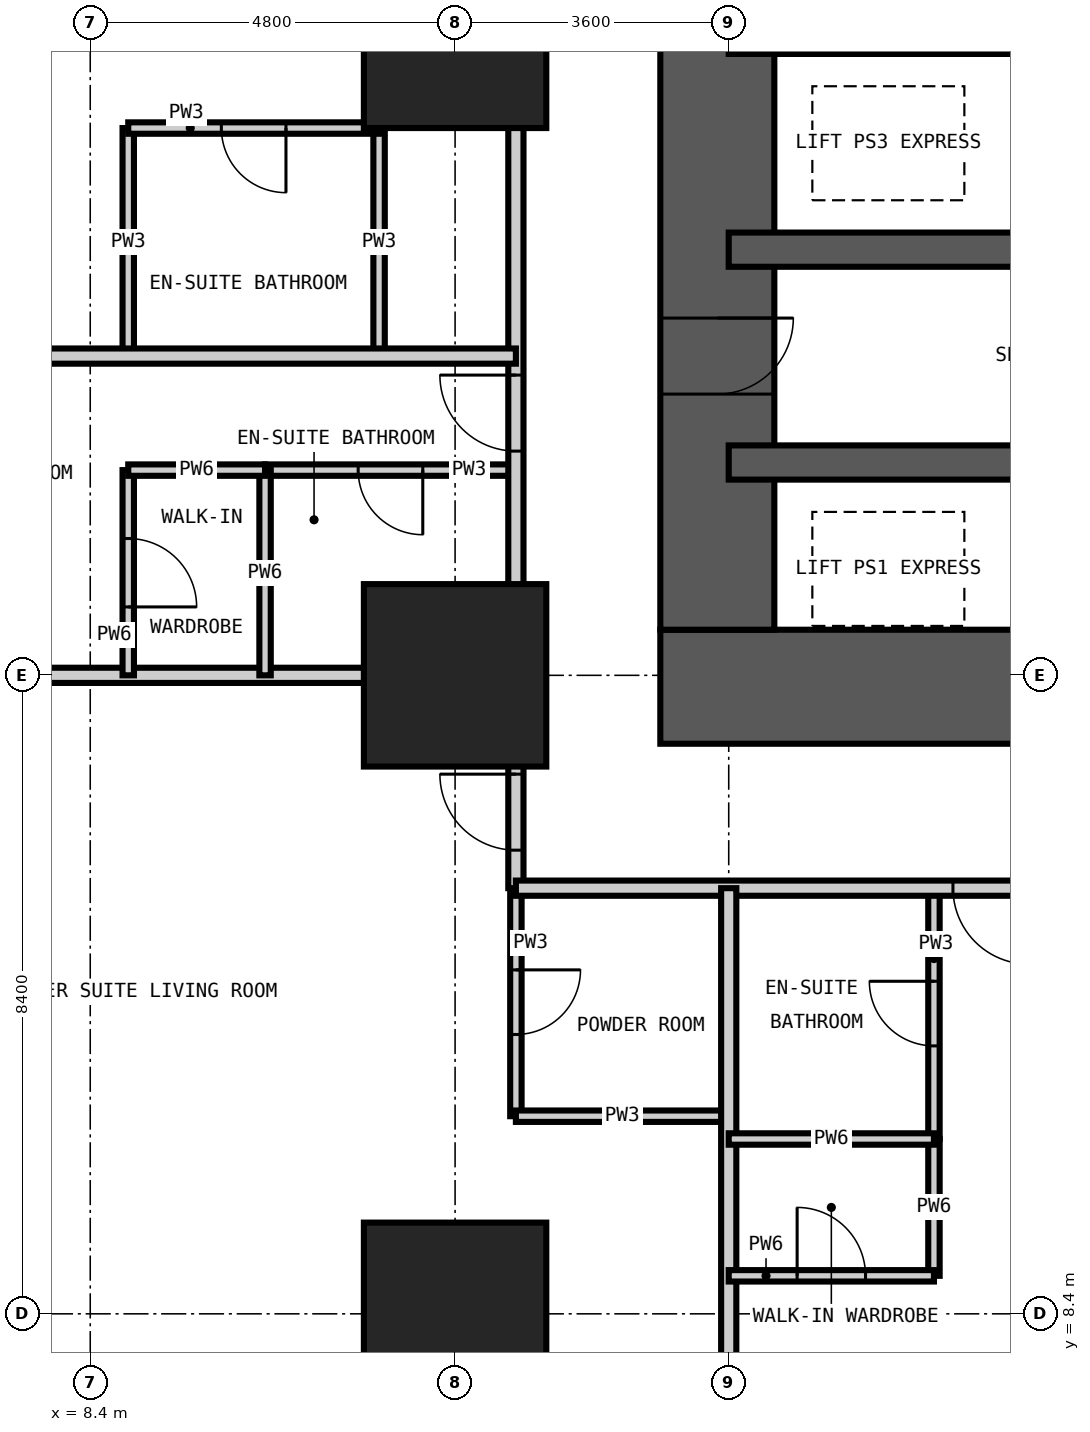
"""IFC4 building model, lengths in metres.
Left out: names, types, materials, properties, quantities, classifications, styles, units other than length and angle.
Written with IfcOpenShell. Run it as: python <this file> out.ifc"""

import sys

from ifc_helpers import new_model, si_unit, direction, frame, frame_2d, origin, origin_2d, place, context, subcontext, project, spatial, rectangle, extrude, element, fill, save


model = new_model("IFC4")
c1 = context("Model", 3, precision=1e-05, world=origin(), true_north=direction((0.0, 1.0)))
c2 = subcontext(c1, "Body", "Model", "MODEL_VIEW")
j1 = project(units=[si_unit("LENGTHUNIT", "METRE"), si_unit("PLANEANGLEUNIT", "RADIAN")], contexts=[c1])
p1 = place(None, origin())
s1 = spatial("IfcSite", under=j1, at=p1, CompositionType="ELEMENT")
p2 = place(p1, origin())
s2 = spatial("IfcBuilding", under=s1, at=p2, CompositionType="ELEMENT")
p3 = place(p2, frame((0.0, 0.0, 81.0)))
s3 = spatial("IfcBuildingStorey", under=s2, at=p3, CompositionType="ELEMENT", Elevation=81.0)
for number, where, z_axis, x_axis in (
    (1, (13.2, 8.4, -0.35), (0.0, 0.0, 1.0), (1.0, 0.0, 0.0)),
    (2, (13.2, 16.8, -0.35), (0.0, 0.0, 1.0), (1.0, 0.0, 0.0)),
    (3, (13.2, 25.2, -0.35), (0.0, 0.0, 1.0), (1.0, 0.0, 0.0)),
):
    element("IfcColumn", number, at=place(p3, frame(where, z_axis=z_axis, x_axis=x_axis)), inside=s3, PredefinedType="COLUMN", context=c2, shape_type="SweptSolid", body=[
        extrude(rectangle(XDim=2.4, YDim=2.4, at=origin_2d()), origin(), (0.0, 0.0, 1.0), 3.6),
    ])
p4 = place(p3, frame((15.9, 16.65, -0.35), z_axis=(0.0, 0.0, 1.0), x_axis=(1.0, 0.0, 0.0)))
e4 = element("IfcWall", 4, at=p4, inside=s3, PredefinedType="SHEAR", context=c2, shape_type="SweptSolid", body=[
    extrude(rectangle(XDim=27.0, YDim=1.5, at=frame_2d((13.5, 0.0))), origin(), (0.0, 0.0, 1.0), 3.6),
])
p5 = place(p4, frame((13.0, 0.0, 0.35)))
e5 = element("IfcOpeningElement", 5, at=p5, cuts=e4, PredefinedType="OPENING", context=c2, shape_type="SweptSolid", body=[
    extrude(rectangle(XDim=1.0, YDim=2.1, at=frame_2d((0.5, 1.05))), frame((0.0, 0.76, 0.0), z_axis=(0.0, -1.0, 0.0), x_axis=(1.0, 0.0, 0.0)), (0.0, 0.0, 1.0), 1.52),
])
p6 = place(p4, frame((19.3, 0.0, 0.35)))
e6 = element("IfcOpeningElement", 6, at=p6, cuts=e4, PredefinedType="OPENING", context=c2, shape_type="SweptSolid", body=[
    extrude(rectangle(XDim=1.0, YDim=2.1, at=frame_2d((0.5, 1.05))), frame((0.0, 0.76, 0.0), z_axis=(0.0, -1.0, 0.0), x_axis=(1.0, 0.0, 0.0)), (0.0, 0.0, 1.0), 1.52),
])
p7 = place(p3, frame((16.65, 41.4, -0.35), z_axis=(0.0, 0.0, 1.0), x_axis=(0.0, -1.0, 0.0)))
e7 = element("IfcWall", 7, at=p7, inside=s3, PredefinedType="SHEAR", context=c2, shape_type="SweptSolid", body=[
    extrude(rectangle(XDim=24.0, YDim=1.5, at=frame_2d((12.0, 0.0))), origin(), (0.0, 0.0, 1.0), 3.6),
])
p8 = place(p7, frame((11.1, 0.0, 0.35)))
e8 = element("IfcOpeningElement", 8, at=p8, cuts=e7, PredefinedType="OPENING", context=c2, shape_type="SweptSolid", body=[
    extrude(rectangle(XDim=1.8, YDim=2.2, at=frame_2d((0.9, 1.1))), frame((0.0, 0.76, 0.0), z_axis=(0.0, -1.0, 0.0), x_axis=(1.0, 0.0, 0.0)), (0.0, 0.0, 1.0), 1.52),
])
p9 = place(p7, frame((19.9, 0.0, 0.35)))
e9 = element("IfcOpeningElement", 9, at=p9, cuts=e7, PredefinedType="OPENING", context=c2, shape_type="SweptSolid", body=[
    extrude(rectangle(XDim=1.0, YDim=2.1, at=frame_2d((0.5, 1.05))), frame((0.0, 0.76, 0.0), z_axis=(0.0, -1.0, 0.0), x_axis=(1.0, 0.0, 0.0)), (0.0, 0.0, 1.0), 1.52),
])
p10 = place(p7, frame((5.2, 0.0, 0.35)))
e10 = element("IfcOpeningElement", 10, at=p10, cuts=e7, PredefinedType="OPENING", context=c2, shape_type="SweptSolid", body=[
    extrude(rectangle(XDim=1.0, YDim=2.1, at=frame_2d((0.5, 1.05))), frame((0.0, 0.76, 0.0), z_axis=(0.0, -1.0, 0.0), x_axis=(1.0, 0.0, 0.0)), (0.0, 0.0, 1.0), 1.52),
])
for number, where, z_axis, x_axis in (
    (11, (16.8, 19.6, -0.35), (0.0, 0.0, 1.0), (1.0, 0.0, 0.0)),
    (12, (16.8, 22.4, -0.35), (0.0, 0.0, 1.0), (1.0, 0.0, 0.0)),
):
    element("IfcWall", number, at=place(p3, frame(where, z_axis=z_axis, x_axis=x_axis)), inside=s3, PredefinedType="SHEAR", context=c2, shape_type="SweptSolid", body=[
        extrude(rectangle(XDim=8.4, YDim=0.45, at=frame_2d((4.2, 0.0))), origin(), (0.0, 0.0, 1.0), 3.6),
    ])
p11 = place(p3, frame((16.8, 25.2, -0.35), z_axis=(0.0, 0.0, 1.0), x_axis=(1.0, 0.0, 0.0)))
e13 = element("IfcWall", 13, at=p11, inside=s3, PredefinedType="SHEAR", context=c2, shape_type="SweptSolid", body=[
    extrude(rectangle(XDim=25.2, YDim=0.45, at=frame_2d((12.6, 0.0))), origin(), (0.0, 0.0, 1.0), 3.6),
])
for number, where, z_axis, x_axis in (
    (14, (8.9, 21.0, 0.0), (0.0, 0.0, 1.0), (0.0, 1.0, 0.0)),
    (15, (12.2, 21.0, 0.0), (0.0, 0.0, 1.0), (0.0, 1.0, 0.0)),
):
    element("IfcWall", number, at=place(p3, frame(where, z_axis=z_axis, x_axis=x_axis)), inside=s3, PredefinedType="PARTITIONING", context=c2, shape_type="SweptSolid", body=[
        extrude(rectangle(XDim=3.0, YDim=0.15, at=frame_2d((1.5, 0.0))), origin(), (0.0, 0.0, 1.0), 3.25),
    ])
p12 = place(p3, frame((14.0, 11.0, 0.0), z_axis=(0.0, 0.0, 1.0), x_axis=(0.0, 1.0, 0.0)))
e16 = element("IfcWall", 16, at=p12, inside=s3, PredefinedType="PARTITIONING", context=c2, shape_type="SweptSolid", body=[
    extrude(rectangle(XDim=3.0, YDim=0.15, at=frame_2d((1.5, 0.0))), origin(), (0.0, 0.0, 1.0), 3.25),
])
p13 = place(p12, frame((1.075, 0.0, 0.0)))
e17 = element("IfcOpeningElement", 17, at=p13, cuts=e16, PredefinedType="OPENING", context=c2, shape_type="SweptSolid", body=[
    extrude(rectangle(XDim=0.85, YDim=2.1, at=frame_2d((0.425, 1.05))), frame((0.0, 0.085, 0.0), z_axis=(0.0, -1.0, 0.0), x_axis=(1.0, 0.0, 0.0)), (0.0, 0.0, 1.0), 0.17),
])
p14 = place(p3, frame((19.5, 10.7, 0.0), z_axis=(0.0, 0.0, 1.0), x_axis=(0.0, 1.0, 0.0)))
e18 = element("IfcWall", 18, at=p14, inside=s3, PredefinedType="PARTITIONING", context=c2, shape_type="SweptSolid", body=[
    extrude(rectangle(XDim=3.3, YDim=0.15, at=frame_2d((1.65, 0.0))), origin(), (0.0, 0.0, 1.0), 3.25),
])
p15 = place(p14, frame((1.225, 0.0, 0.0)))
e19 = element("IfcOpeningElement", 19, at=p15, cuts=e18, PredefinedType="OPENING", context=c2, shape_type="SweptSolid", body=[
    extrude(rectangle(XDim=0.85, YDim=2.1, at=frame_2d((0.425, 1.05))), frame((0.0, 0.085, 0.0), z_axis=(0.0, -1.0, 0.0), x_axis=(1.0, 0.0, 0.0)), (0.0, 0.0, 1.0), 0.17),
])
p16 = place(p3, frame((14.0, 11.0, 0.0), z_axis=(0.0, 0.0, 1.0), x_axis=(1.0, 0.0, 0.0)))
e20 = element("IfcWall", 20, at=p16, inside=s3, PredefinedType="PARTITIONING", context=c2, shape_type="SweptSolid", body=[
    extrude(rectangle(XDim=2.8, YDim=0.15, at=frame_2d((1.4, 0.0))), origin(), (0.0, 0.0, 1.0), 3.25),
])
p17 = place(p3, frame((10.7, 19.5, 0.0), z_axis=(0.0, 0.0, 1.0), x_axis=(1.0, 0.0, 0.0)))
e21 = element("IfcWall", 21, at=p17, inside=s3, PredefinedType="PARTITIONING", context=c2, shape_type="SweptSolid", body=[
    extrude(rectangle(XDim=3.3, YDim=0.15, at=frame_2d((1.65, 0.0))), origin(), (0.0, 0.0, 1.0), 3.25),
])
p18 = place(p17, frame((1.225, 0.0, 0.0)))
e22 = element("IfcOpeningElement", 22, at=p18, cuts=e21, PredefinedType="OPENING", context=c2, shape_type="SweptSolid", body=[
    extrude(rectangle(XDim=0.85, YDim=2.1, at=frame_2d((0.425, 1.05))), frame((0.0, 0.085, 0.0), z_axis=(0.0, -1.0, 0.0), x_axis=(1.0, 0.0, 0.0)), (0.0, 0.0, 1.0), 0.17),
])
p19 = place(p3, frame((8.9, 24.0, 0.0), z_axis=(0.0, 0.0, 1.0), x_axis=(1.0, 0.0, 0.0)))
e23 = element("IfcWall", 23, at=p19, inside=s3, PredefinedType="PARTITIONING", context=c2, shape_type="SweptSolid", body=[
    extrude(rectangle(XDim=3.3, YDim=0.15, at=frame_2d((1.65, 0.0))), origin(), (0.0, 0.0, 1.0), 3.25),
])
p20 = place(p19, frame((1.225, 0.0, 0.0)))
e24 = element("IfcOpeningElement", 24, at=p20, cuts=e23, PredefinedType="OPENING", context=c2, shape_type="SweptSolid", body=[
    extrude(rectangle(XDim=0.85, YDim=2.1, at=frame_2d((0.425, 1.05))), frame((0.0, 0.085, 0.0), z_axis=(0.0, -1.0, 0.0), x_axis=(1.0, 0.0, 0.0)), (0.0, 0.0, 1.0), 0.17),
])
p21 = place(p3, frame((14.0, 14.0, 0.0), z_axis=(0.0, 0.0, 1.0), x_axis=(0.0, 1.0, 0.0)))
e25 = element("IfcWall", 25, at=p21, inside=s3, PredefinedType="PARTITIONING", context=c2, shape_type="SweptSolid", body=[
    extrude(rectangle(XDim=32.0, YDim=0.2, at=frame_2d((16.0, 0.0))), origin(), (0.0, 0.0, 1.0), 3.25),
])
p22 = place(p21, frame((5.75, 0.0, 0.0)))
e26 = element("IfcOpeningElement", 26, at=p22, cuts=e25, PredefinedType="OPENING", context=c2, shape_type="SweptSolid", body=[
    extrude(rectangle(XDim=1.0, YDim=2.2, at=frame_2d((0.5, 1.1))), frame((0.0, 0.11, 0.0), z_axis=(0.0, -1.0, 0.0), x_axis=(1.0, 0.0, 0.0)), (0.0, 0.0, 1.0), 0.22),
])
p23 = place(p21, frame((12.5, 0.0, 0.0)))
e27 = element("IfcOpeningElement", 27, at=p23, cuts=e25, PredefinedType="OPENING", context=c2, shape_type="SweptSolid", body=[
    extrude(rectangle(XDim=1.0, YDim=2.2, at=frame_2d((0.5, 1.1))), frame((0.0, 0.11, 0.0), z_axis=(0.0, -1.0, 0.0), x_axis=(1.0, 0.0, 0.0)), (0.0, 0.0, 1.0), 0.22),
])
p24 = place(p21, frame((17.3, 0.0, 0.0)))
e28 = element("IfcOpeningElement", 28, at=p24, cuts=e25, PredefinedType="OPENING", context=c2, shape_type="SweptSolid", body=[
    extrude(rectangle(XDim=1.0, YDim=2.2, at=frame_2d((0.5, 1.1))), frame((0.0, 0.11, 0.0), z_axis=(0.0, -1.0, 0.0), x_axis=(1.0, 0.0, 0.0)), (0.0, 0.0, 1.0), 0.22),
])
p25 = place(p21, frame((24.05, 0.0, 0.0)))
e29 = element("IfcOpeningElement", 29, at=p25, cuts=e25, PredefinedType="OPENING", context=c2, shape_type="SweptSolid", body=[
    extrude(rectangle(XDim=1.0, YDim=2.2, at=frame_2d((0.5, 1.1))), frame((0.0, 0.11, 0.0), z_axis=(0.0, -1.0, 0.0), x_axis=(1.0, 0.0, 0.0)), (0.0, 0.0, 1.0), 0.22),
])
p26 = place(p21, frame((0.5, 0.0, 0.0)))
e30 = element("IfcOpeningElement", 30, at=p26, cuts=e25, PredefinedType="OPENING", context=c2, shape_type="SweptSolid", body=[
    extrude(rectangle(XDim=1.0, YDim=2.2, at=frame_2d((0.5, 1.1))), frame((0.0, 0.11, 0.0), z_axis=(0.0, -1.0, 0.0), x_axis=(1.0, 0.0, 0.0)), (0.0, 0.0, 1.0), 0.22),
])
p27 = place(p21, frame((29.5, 0.0, 0.0)))
e31 = element("IfcOpeningElement", 31, at=p27, cuts=e25, PredefinedType="OPENING", context=c2, shape_type="SweptSolid", body=[
    extrude(rectangle(XDim=1.0, YDim=2.2, at=frame_2d((0.5, 1.1))), frame((0.0, 0.11, 0.0), z_axis=(0.0, -1.0, 0.0), x_axis=(1.0, 0.0, 0.0)), (0.0, 0.0, 1.0), 0.22),
])
p28 = place(p3, frame((45.4, 14.0, 0.0), z_axis=(0.0, 0.0, 1.0), x_axis=(-1.0, 0.0, 0.0)))
e32 = element("IfcWall", 32, at=p28, inside=s3, PredefinedType="PARTITIONING", context=c2, shape_type="SweptSolid", body=[
    extrude(rectangle(XDim=31.4, YDim=0.2, at=frame_2d((15.7, 0.0))), origin(), (0.0, 0.0, 1.0), 3.25),
])
p29 = place(p28, frame((24.65, 0.0, 0.0)))
e33 = element("IfcOpeningElement", 33, at=p29, cuts=e32, PredefinedType="OPENING", context=c2, shape_type="SweptSolid", body=[
    extrude(rectangle(XDim=1.0, YDim=2.2, at=frame_2d((0.5, 1.1))), frame((0.0, 0.11, 0.0), z_axis=(0.0, -1.0, 0.0), x_axis=(1.0, 0.0, 0.0)), (0.0, 0.0, 1.0), 0.22),
])
p30 = place(p28, frame((23.15, 0.0, 0.0)))
e34 = element("IfcOpeningElement", 34, at=p30, cuts=e32, PredefinedType="OPENING", context=c2, shape_type="SweptSolid", body=[
    extrude(rectangle(XDim=1.0, YDim=2.2, at=frame_2d((0.5, 1.1))), frame((0.0, 0.11, 0.0), z_axis=(0.0, -1.0, 0.0), x_axis=(1.0, 0.0, 0.0)), (0.0, 0.0, 1.0), 0.22),
])
p31 = place(p28, frame((13.4, 0.0, 0.0)))
e35 = element("IfcOpeningElement", 35, at=p31, cuts=e32, PredefinedType="OPENING", context=c2, shape_type="SweptSolid", body=[
    extrude(rectangle(XDim=1.0, YDim=2.2, at=frame_2d((0.5, 1.1))), frame((0.0, 0.11, 0.0), z_axis=(0.0, -1.0, 0.0), x_axis=(1.0, 0.0, 0.0)), (0.0, 0.0, 1.0), 0.22),
])
p32 = place(p28, frame((6.35, 0.0, 0.0)))
e36 = element("IfcOpeningElement", 36, at=p32, cuts=e32, PredefinedType="OPENING", context=c2, shape_type="SweptSolid", body=[
    extrude(rectangle(XDim=1.0, YDim=2.2, at=frame_2d((0.5, 1.1))), frame((0.0, 0.11, 0.0), z_axis=(0.0, -1.0, 0.0), x_axis=(1.0, 0.0, 0.0)), (0.0, 0.0, 1.0), 0.22),
])
for number, where, z_axis, x_axis in (
    (37, (16.8, -0.008, 0.0), (0.0, 0.0, 1.0), (0.0, 1.0, 0.0)),
    (38, (-0.008, 16.8, 0.0), (0.0, 0.0, 1.0), (1.0, 0.0, 0.0)),
    (39, (-0.008, 21.0, 0.0), (0.0, 0.0, 1.0), (1.0, 0.0, 0.0)),
):
    element("IfcWall", number, at=place(p3, frame(where, z_axis=z_axis, x_axis=x_axis)), inside=s3, PredefinedType="PARTITIONING", context=c2, shape_type="SweptSolid", body=[
        extrude(rectangle(XDim=14.008, YDim=0.2, at=frame_2d((7.004, 0.0))), origin(), (0.0, 0.0, 1.0), 3.25),
    ])
p33 = place(p3, frame((8.9, 16.8, 0.0), z_axis=(0.0, 0.0, 1.0), x_axis=(0.0, 1.0, 0.0)))
e40 = element("IfcWall", 40, at=p33, inside=s3, PredefinedType="PARTITIONING", context=c2, shape_type="SweptSolid", body=[
    extrude(rectangle(XDim=2.7, YDim=0.15, at=frame_2d((1.35, 0.0))), origin(), (0.0, 0.0, 1.0), 3.25),
])
p34 = place(p33, frame((0.9, 0.0, 0.0)))
e41 = element("IfcOpeningElement", 41, at=p34, cuts=e40, PredefinedType="OPENING", context=c2, shape_type="SweptSolid", body=[
    extrude(rectangle(XDim=0.9, YDim=2.1, at=frame_2d((0.45, 1.05))), frame((0.0, 0.085, 0.0), z_axis=(0.0, -1.0, 0.0), x_axis=(1.0, 0.0, 0.0)), (0.0, 0.0, 1.0), 0.17),
])
p35 = place(p3, frame((10.7, 16.8, 0.0), z_axis=(0.0, 0.0, 1.0), x_axis=(0.0, 1.0, 0.0)))
e42 = element("IfcWall", 42, at=p35, inside=s3, PredefinedType="PARTITIONING", context=c2, shape_type="SweptSolid", body=[
    extrude(rectangle(XDim=2.7, YDim=0.15, at=frame_2d((1.35, 0.0))), origin(), (0.0, 0.0, 1.0), 3.25),
])
p36 = place(p3, frame((19.5, 8.9, 0.0), z_axis=(0.0, 0.0, 1.0), x_axis=(0.0, 1.0, 0.0)))
e43 = element("IfcWall", 43, at=p36, inside=s3, PredefinedType="PARTITIONING", context=c2, shape_type="SweptSolid", body=[
    extrude(rectangle(XDim=1.8, YDim=0.15, at=frame_2d((0.9, 0.0))), origin(), (0.0, 0.0, 1.0), 3.25),
])
p37 = place(p3, frame((16.8, 8.9, 0.0), z_axis=(0.0, 0.0, 1.0), x_axis=(1.0, 0.0, 0.0)))
e44 = element("IfcWall", 44, at=p37, inside=s3, PredefinedType="PARTITIONING", context=c2, shape_type="SweptSolid", body=[
    extrude(rectangle(XDim=2.7, YDim=0.15, at=frame_2d((1.35, 0.0))), origin(), (0.0, 0.0, 1.0), 3.25),
])
p38 = place(p37, frame((0.9, 0.0, 0.0)))
e45 = element("IfcOpeningElement", 45, at=p38, cuts=e44, PredefinedType="OPENING", context=c2, shape_type="SweptSolid", body=[
    extrude(rectangle(XDim=0.9, YDim=2.1, at=frame_2d((0.45, 1.05))), frame((0.0, 0.085, 0.0), z_axis=(0.0, -1.0, 0.0), x_axis=(1.0, 0.0, 0.0)), (0.0, 0.0, 1.0), 0.17),
])
p39 = place(p3, frame((16.8, 10.7, 0.0), z_axis=(0.0, 0.0, 1.0), x_axis=(1.0, 0.0, 0.0)))
e46 = element("IfcWall", 46, at=p39, inside=s3, PredefinedType="PARTITIONING", context=c2, shape_type="SweptSolid", body=[
    extrude(rectangle(XDim=2.7, YDim=0.15, at=frame_2d((1.35, 0.0))), origin(), (0.0, 0.0, 1.0), 3.25),
])
p40 = place(p3, frame((8.9, 19.5, 0.0), z_axis=(0.0, 0.0, 1.0), x_axis=(1.0, 0.0, 0.0)))
e47 = element("IfcWall", 47, at=p40, inside=s3, PredefinedType="PARTITIONING", context=c2, shape_type="SweptSolid", body=[
    extrude(rectangle(XDim=1.8, YDim=0.15, at=frame_2d((0.9, 0.0))), origin(), (0.0, 0.0, 1.0), 3.25),
])
p41 = place(p29, origin())
e48 = element("IfcDoor", 48, at=p41, inside=s3, OperationType="SINGLE_SWING_LEFT", PredefinedType="DOOR", context=c2, shape_type="SweptSolid", body=[
    extrude(rectangle(XDim=1.0, YDim=2.2, at=frame_2d((0.5, 1.1))), frame((0.0, 0.025, 0.0), z_axis=(0.0, -1.0, 0.0), x_axis=(1.0, 0.0, 0.0)), (0.0, 0.0, 1.0), 0.05),
])
fill(e33, e48)
p42 = place(p15, origin())
e49 = element("IfcDoor", 49, at=p42, inside=s3, OperationType="SINGLE_SWING_RIGHT", PredefinedType="DOOR", context=c2, shape_type="SweptSolid", body=[
    extrude(rectangle(XDim=0.85, YDim=2.1, at=frame_2d((0.425, 1.05))), frame((0.0, 0.025, 0.0), z_axis=(0.0, -1.0, 0.0), x_axis=(1.0, 0.0, 0.0)), (0.0, 0.0, 1.0), 0.05),
])
fill(e19, e49)
p43 = place(p38, origin())
e50 = element("IfcDoor", 50, at=p43, inside=s3, OperationType="SINGLE_SWING_LEFT", PredefinedType="DOOR", context=c2, shape_type="SweptSolid", body=[
    extrude(rectangle(XDim=0.9, YDim=2.1, at=frame_2d((0.45, 1.05))), frame((0.0, 0.025, 0.0), z_axis=(0.0, -1.0, 0.0), x_axis=(1.0, 0.0, 0.0)), (0.0, 0.0, 1.0), 0.05),
])
fill(e45, e50)
p44 = place(p22, origin())
e51 = element("IfcDoor", 51, at=p44, inside=s3, OperationType="SINGLE_SWING_RIGHT", PredefinedType="DOOR", context=c2, shape_type="SweptSolid", body=[
    extrude(rectangle(XDim=1.0, YDim=2.2, at=frame_2d((0.5, 1.1))), frame((0.0, 0.025, 0.0), z_axis=(0.0, -1.0, 0.0), x_axis=(1.0, 0.0, 0.0)), (0.0, 0.0, 1.0), 0.05),
])
fill(e26, e51)
p45 = place(p18, frame((0.85, 0.0, 0.0), z_axis=(0.0, 0.0, 1.0), x_axis=(-1.0, 0.0, 0.0)))
e52 = element("IfcDoor", 52, at=p45, inside=s3, OperationType="SINGLE_SWING_LEFT", PredefinedType="DOOR", context=c2, shape_type="SweptSolid", body=[
    extrude(rectangle(XDim=0.85, YDim=2.1, at=frame_2d((0.425, 1.05))), frame((0.0, 0.025, 0.0), z_axis=(0.0, -1.0, 0.0), x_axis=(1.0, 0.0, 0.0)), (0.0, 0.0, 1.0), 0.05),
])
fill(e22, e52)
p46 = place(p34, frame((0.9, 0.0, 0.0), z_axis=(0.0, 0.0, 1.0), x_axis=(-1.0, 0.0, 0.0)))
e53 = element("IfcDoor", 53, at=p46, inside=s3, OperationType="SINGLE_SWING_RIGHT", PredefinedType="DOOR", context=c2, shape_type="SweptSolid", body=[
    extrude(rectangle(XDim=0.9, YDim=2.1, at=frame_2d((0.45, 1.05))), frame((0.0, 0.025, 0.0), z_axis=(0.0, -1.0, 0.0), x_axis=(1.0, 0.0, 0.0)), (0.0, 0.0, 1.0), 0.05),
])
fill(e41, e53)
p47 = place(p20, frame((0.85, 0.0, 0.0), z_axis=(0.0, 0.0, 1.0), x_axis=(-1.0, 0.0, 0.0)))
e54 = element("IfcDoor", 54, at=p47, inside=s3, OperationType="SINGLE_SWING_LEFT", PredefinedType="DOOR", context=c2, shape_type="SweptSolid", body=[
    extrude(rectangle(XDim=0.85, YDim=2.1, at=frame_2d((0.425, 1.05))), frame((0.0, 0.025, 0.0), z_axis=(0.0, -1.0, 0.0), x_axis=(1.0, 0.0, 0.0)), (0.0, 0.0, 1.0), 0.05),
])
fill(e24, e54)
p48 = place(p26, origin())
e55 = element("IfcDoor", 55, at=p48, inside=s3, OperationType="SINGLE_SWING_RIGHT", PredefinedType="DOOR", context=c2, shape_type="SweptSolid", body=[
    extrude(rectangle(XDim=1.0, YDim=2.2, at=frame_2d((0.5, 1.1))), frame((0.0, 0.025, 0.0), z_axis=(0.0, -1.0, 0.0), x_axis=(1.0, 0.0, 0.0)), (0.0, 0.0, 1.0), 0.05),
])
fill(e30, e55)
p49 = place(p13, frame((0.85, 0.0, 0.0), z_axis=(0.0, 0.0, 1.0), x_axis=(-1.0, 0.0, 0.0)))
e56 = element("IfcDoor", 56, at=p49, inside=s3, OperationType="SINGLE_SWING_LEFT", PredefinedType="DOOR", context=c2, shape_type="SweptSolid", body=[
    extrude(rectangle(XDim=0.85, YDim=2.1, at=frame_2d((0.425, 1.05))), frame((0.0, 0.025, 0.0), z_axis=(0.0, -1.0, 0.0), x_axis=(1.0, 0.0, 0.0)), (0.0, 0.0, 1.0), 0.05),
])
fill(e17, e56)
p50 = place(p9, origin())
e57 = element("IfcDoor", 57, at=p50, inside=s3, OperationType="SINGLE_SWING_LEFT", PredefinedType="DOOR", context=c2, shape_type="SweptSolid", body=[
    extrude(rectangle(XDim=1.0, YDim=2.1, at=frame_2d((0.5, 1.05))), frame((0.0, 0.025, 0.0), z_axis=(0.0, -1.0, 0.0), x_axis=(1.0, 0.0, 0.0)), (0.0, 0.0, 1.0), 0.05),
])
fill(e9, e57)
save(model, sys.argv[1])
